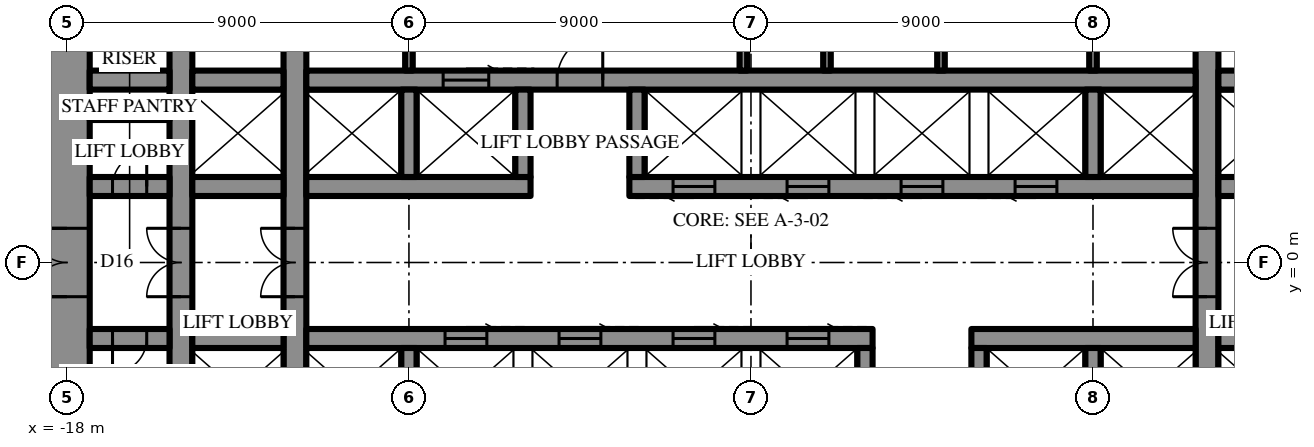
"""IFC4 building model, lengths in metres.
Left out: names, types, materials, properties, quantities, classifications, styles, units other than length and angle.
Written with IfcOpenShell. Run it as: python <this file> out.ifc"""

import sys

from ifc_helpers import new_model, si_unit, direction, frame, frame_2d, origin, place, context, subcontext, project, spatial, rectangle, extrude, element, fill, save


model = new_model("IFC4")
c1 = context("Model", 3, precision=1e-05, world=origin(), true_north=direction((0.0, 1.0)))
c2 = subcontext(c1, "Body", "Model", "MODEL_VIEW")
j1 = project(units=[si_unit("LENGTHUNIT", "METRE"), si_unit("PLANEANGLEUNIT", "RADIAN")], contexts=[c1])
p1 = place(None, origin())
s1 = spatial("IfcSite", under=j1, at=p1, CompositionType="ELEMENT")
p2 = place(p1, origin())
s2 = spatial("IfcBuilding", under=s1, at=p2, CompositionType="ELEMENT")
p3 = place(p2, frame((0.0, 0.0, 144.7)))
s3 = spatial("IfcBuildingStorey", under=s2, at=p3, CompositionType="ELEMENT", Elevation=144.7)
p4 = place(p3, frame((-18.0, 10.7, 0.0), z_axis=(0.0, 0.0, 1.0), x_axis=(0.0, -1.0, 0.0)))
e1 = element("IfcWall", 1, at=p4, inside=s3, PredefinedType="SHEAR", context=c2, shape_type="SweptSolid", body=[
    extrude(rectangle(XDim=21.4, YDim=1.2, at=frame_2d((10.7, 0.0))), origin(), (0.0, 0.0, 1.0), 4.2),
])
p5 = place(p4, frame((9.8, 0.0, 0.0)))
e2 = element("IfcOpeningElement", 2, at=p5, cuts=e1, PredefinedType="OPENING", context=c2, shape_type="SweptSolid", body=[
    extrude(rectangle(XDim=1.8, YDim=2.4, at=frame_2d((0.9, 1.2))), frame((0.0, 0.61, 0.0), z_axis=(0.0, -1.0, 0.0), x_axis=(1.0, 0.0, 0.0)), (0.0, 0.0, 1.0), 1.22),
])
p6 = place(p3, frame((12.0, -10.7, 0.0), z_axis=(0.0, 0.0, 1.0), x_axis=(0.0, 1.0, 0.0)))
e3 = element("IfcWall", 3, at=p6, inside=s3, PredefinedType="SHEAR", context=c2, shape_type="SweptSolid", body=[
    extrude(rectangle(XDim=21.4, YDim=0.6, at=frame_2d((10.7, 0.0))), origin(), (0.0, 0.0, 1.0), 4.2),
])
p7 = place(p6, frame((9.8, 0.0, 0.0)))
e4 = element("IfcOpeningElement", 4, at=p7, cuts=e3, PredefinedType="OPENING", context=c2, shape_type="SweptSolid", body=[
    extrude(rectangle(XDim=1.8, YDim=2.4, at=frame_2d((0.9, 1.2))), frame((0.0, 0.31, 0.0), z_axis=(0.0, -1.0, 0.0), x_axis=(1.0, 0.0, 0.0)), (0.0, 0.0, 1.0), 0.62),
])
p8 = place(p3, frame((-12.0, -10.7, 0.0), z_axis=(0.0, 0.0, 1.0), x_axis=(0.0, 1.0, 0.0)))
e5 = element("IfcWall", 5, at=p8, inside=s3, PredefinedType="SHEAR", context=c2, shape_type="SweptSolid", body=[
    extrude(rectangle(XDim=21.4, YDim=0.6, at=frame_2d((10.7, 0.0))), origin(), (0.0, 0.0, 1.0), 4.2),
])
p9 = place(p8, frame((9.8, 0.0, 0.0)))
e6 = element("IfcOpeningElement", 6, at=p9, cuts=e5, PredefinedType="OPENING", context=c2, shape_type="SweptSolid", body=[
    extrude(rectangle(XDim=1.8, YDim=2.4, at=frame_2d((0.9, 1.2))), frame((0.0, 0.31, 0.0), z_axis=(0.0, -1.0, 0.0), x_axis=(1.0, 0.0, 0.0)), (0.0, 0.0, 1.0), 0.62),
])
p10 = place(p3, frame((-15.0, -10.7, 0.0), z_axis=(0.0, 0.0, 1.0), x_axis=(0.0, 1.0, 0.0)))
e7 = element("IfcWall", 7, at=p10, inside=s3, PredefinedType="SHEAR", context=c2, shape_type="SweptSolid", body=[
    extrude(rectangle(XDim=21.4, YDim=0.6, at=frame_2d((10.7, 0.0))), origin(), (0.0, 0.0, 1.0), 4.2),
])
p11 = place(p10, frame((9.8, 0.0, 0.0)))
e8 = element("IfcOpeningElement", 8, at=p11, cuts=e7, PredefinedType="OPENING", context=c2, shape_type="SweptSolid", body=[
    extrude(rectangle(XDim=1.8, YDim=2.4, at=frame_2d((0.9, 1.2))), frame((0.0, 0.31, 0.0), z_axis=(0.0, -1.0, 0.0), x_axis=(1.0, 0.0, 0.0)), (0.0, 0.0, 1.0), 0.62),
])
p12 = place(p3, frame((-17.4, 2.0, 0.0), z_axis=(0.0, 0.0, 1.0), x_axis=(1.0, 0.0, 0.0)))
e9 = element("IfcWall", 9, at=p12, inside=s3, PredefinedType="SHEAR", context=c2, shape_type="SweptSolid", body=[
    extrude(rectangle(XDim=2.1, YDim=0.5, at=frame_2d((1.05, 0.0))), origin(), (0.0, 0.0, 1.0), 4.2),
])
p13 = place(p12, frame((0.6, 0.0, 0.0)))
e10 = element("IfcOpeningElement", 10, at=p13, cuts=e9, PredefinedType="OPENING", context=c2, shape_type="SweptSolid", body=[
    extrude(rectangle(XDim=0.9, YDim=2.2, at=frame_2d((0.45, 1.1))), frame((0.0, 0.26, 0.0), z_axis=(0.0, -1.0, 0.0), x_axis=(1.0, 0.0, 0.0)), (0.0, 0.0, 1.0), 0.52),
])
p14 = place(p3, frame((-14.7, 2.0, 0.0), z_axis=(0.0, 0.0, 1.0), x_axis=(1.0, 0.0, 0.0)))
e11 = element("IfcWall", 11, at=p14, inside=s3, PredefinedType="SHEAR", context=c2, shape_type="SweptSolid", body=[
    extrude(rectangle(XDim=2.4, YDim=0.5, at=frame_2d((1.2, 0.0))), origin(), (0.0, 0.0, 1.0), 4.2),
])
p15 = place(p3, frame((-11.7, 2.0, 0.0), z_axis=(0.0, 0.0, 1.0), x_axis=(1.0, 0.0, 0.0)))
e12 = element("IfcWall", 12, at=p15, inside=s3, PredefinedType="SHEAR", context=c2, shape_type="SweptSolid", body=[
    extrude(rectangle(XDim=5.9, YDim=0.5, at=frame_2d((2.95, 0.0))), origin(), (0.0, 0.0, 1.0), 4.2),
])
p16 = place(p3, frame((-3.2, 2.0, 0.0), z_axis=(0.0, 0.0, 1.0), x_axis=(1.0, 0.0, 0.0)))
e13 = element("IfcWall", 13, at=p16, inside=s3, PredefinedType="SHEAR", context=c2, shape_type="SweptSolid", body=[
    extrude(rectangle(XDim=14.9, YDim=0.5, at=frame_2d((7.45, 0.0))), origin(), (0.0, 0.0, 1.0), 4.2),
])
p17 = place(p16, frame((1.15, 0.0, 0.0)))
e14 = element("IfcOpeningElement", 14, at=p17, cuts=e13, PredefinedType="OPENING", context=c2, shape_type="SweptSolid", body=[
    extrude(rectangle(XDim=1.1, YDim=2.2, at=frame_2d((0.55, 1.1))), frame((0.0, 0.26, 0.0), z_axis=(0.0, -1.0, 0.0), x_axis=(1.0, 0.0, 0.0)), (0.0, 0.0, 1.0), 0.52),
])
p18 = place(p16, frame((4.15, 0.0, 0.0)))
e15 = element("IfcOpeningElement", 15, at=p18, cuts=e13, PredefinedType="OPENING", context=c2, shape_type="SweptSolid", body=[
    extrude(rectangle(XDim=1.1, YDim=2.2, at=frame_2d((0.55, 1.1))), frame((0.0, 0.26, 0.0), z_axis=(0.0, -1.0, 0.0), x_axis=(1.0, 0.0, 0.0)), (0.0, 0.0, 1.0), 0.52),
])
p19 = place(p16, frame((7.15, 0.0, 0.0)))
e16 = element("IfcOpeningElement", 16, at=p19, cuts=e13, PredefinedType="OPENING", context=c2, shape_type="SweptSolid", body=[
    extrude(rectangle(XDim=1.1, YDim=2.2, at=frame_2d((0.55, 1.1))), frame((0.0, 0.26, 0.0), z_axis=(0.0, -1.0, 0.0), x_axis=(1.0, 0.0, 0.0)), (0.0, 0.0, 1.0), 0.52),
])
p20 = place(p16, frame((10.15, 0.0, 0.0)))
e17 = element("IfcOpeningElement", 17, at=p20, cuts=e13, PredefinedType="OPENING", context=c2, shape_type="SweptSolid", body=[
    extrude(rectangle(XDim=1.1, YDim=2.2, at=frame_2d((0.55, 1.1))), frame((0.0, 0.26, 0.0), z_axis=(0.0, -1.0, 0.0), x_axis=(1.0, 0.0, 0.0)), (0.0, 0.0, 1.0), 0.52),
])
p21 = place(p3, frame((12.3, 2.0, 0.0), z_axis=(0.0, 0.0, 1.0), x_axis=(1.0, 0.0, 0.0)))
e18 = element("IfcWall", 18, at=p21, inside=s3, PredefinedType="SHEAR", context=c2, shape_type="SweptSolid", body=[
    extrude(rectangle(XDim=2.4, YDim=0.5, at=frame_2d((1.2, 0.0))), origin(), (0.0, 0.0, 1.0), 4.2),
])
p22 = place(p3, frame((-17.4, 4.8, 0.0), z_axis=(0.0, 0.0, 1.0), x_axis=(1.0, 0.0, 0.0)))
e19 = element("IfcWall", 19, at=p22, inside=s3, PredefinedType="SHEAR", context=c2, shape_type="SweptSolid", body=[
    extrude(rectangle(XDim=2.1, YDim=0.5, at=frame_2d((1.05, 0.0))), origin(), (0.0, 0.0, 1.0), 4.2),
])
p23 = place(p3, frame((-14.7, 4.8, 0.0), z_axis=(0.0, 0.0, 1.0), x_axis=(1.0, 0.0, 0.0)))
e20 = element("IfcWall", 20, at=p23, inside=s3, PredefinedType="SHEAR", context=c2, shape_type="SweptSolid", body=[
    extrude(rectangle(XDim=2.4, YDim=0.5, at=frame_2d((1.2, 0.0))), origin(), (0.0, 0.0, 1.0), 4.2),
])
p24 = place(p3, frame((-11.7, 4.8, 0.0), z_axis=(0.0, 0.0, 1.0), x_axis=(1.0, 0.0, 0.0)))
e21 = element("IfcWall", 21, at=p24, inside=s3, PredefinedType="SHEAR", context=c2, shape_type="SweptSolid", body=[
    extrude(rectangle(XDim=23.4, YDim=0.5, at=frame_2d((11.7, 0.0))), origin(), (0.0, 0.0, 1.0), 4.2),
])
p25 = place(p24, frame((6.6, 0.0, 0.0)))
e22 = element("IfcOpeningElement", 22, at=p25, cuts=e21, PredefinedType="OPENING", context=c2, shape_type="SweptSolid", body=[
    extrude(rectangle(XDim=1.2, YDim=2.2, at=frame_2d((0.6, 1.1))), frame((0.0, 0.26, 0.0), z_axis=(0.0, -1.0, 0.0), x_axis=(1.0, 0.0, 0.0)), (0.0, 0.0, 1.0), 0.52),
])
p26 = place(p24, frame((3.6, 0.0, 0.0)))
e23 = element("IfcOpeningElement", 23, at=p26, cuts=e21, PredefinedType="OPENING", context=c2, shape_type="SweptSolid", body=[
    extrude(rectangle(XDim=1.2, YDim=2.2, at=frame_2d((0.6, 1.1))), frame((0.0, 0.26, 0.0), z_axis=(0.0, -1.0, 0.0), x_axis=(1.0, 0.0, 0.0)), (0.0, 0.0, 1.0), 0.52),
])
p27 = place(p3, frame((12.3, 4.8, 0.0), z_axis=(0.0, 0.0, 1.0), x_axis=(1.0, 0.0, 0.0)))
e24 = element("IfcWall", 24, at=p27, inside=s3, PredefinedType="SHEAR", context=c2, shape_type="SweptSolid", body=[
    extrude(rectangle(XDim=2.4, YDim=0.5, at=frame_2d((1.2, 0.0))), origin(), (0.0, 0.0, 1.0), 4.2),
])
for number, where, z_axis, x_axis in (
    (25, (-9.0, 2.25, 0.0), (0.0, 0.0, 1.0), (0.0, 1.0, 0.0)),
    (26, (-6.0, 2.25, 0.0), (0.0, 0.0, 1.0), (0.0, 1.0, 0.0)),
    (27, (-3.0, 2.25, 0.0), (0.0, 0.0, 1.0), (0.0, 1.0, 0.0)),
    (28, (9.0, 2.25, 0.0), (0.0, 0.0, 1.0), (0.0, 1.0, 0.0)),
):
    element("IfcWall", number, at=place(p3, frame(where, z_axis=z_axis, x_axis=x_axis)), inside=s3, PredefinedType="SHEAR", context=c2, shape_type="SweptSolid", body=[
        extrude(rectangle(XDim=2.3, YDim=0.4, at=frame_2d((1.15, 0.0))), origin(), (0.0, 0.0, 1.0), 4.2),
    ])
p28 = place(p3, frame((-0.2, 5.05, 0.0), z_axis=(0.0, 0.0, 1.0), x_axis=(0.0, 1.0, 0.0)))
e29 = element("IfcWall", 29, at=p28, inside=s3, PredefinedType="SHEAR", context=c2, shape_type="SweptSolid", body=[
    extrude(rectangle(XDim=5.65, YDim=0.2, at=frame_2d((2.825, 0.0))), origin(), (0.0, 0.0, 1.0), 4.2),
])
p29 = place(p3, frame((14.7, -2.0, 0.0), z_axis=(0.0, 0.0, 1.0), x_axis=(-1.0, 0.0, 0.0)))
e30 = element("IfcWall", 30, at=p29, inside=s3, PredefinedType="SHEAR", context=c2, shape_type="SweptSolid", body=[
    extrude(rectangle(XDim=2.4, YDim=0.5, at=frame_2d((1.2, 0.0))), origin(), (0.0, 0.0, 1.0), 4.2),
])
p30 = place(p3, frame((11.7, -2.0, 0.0), z_axis=(0.0, 0.0, 1.0), x_axis=(-1.0, 0.0, 0.0)))
e31 = element("IfcWall", 31, at=p30, inside=s3, PredefinedType="SHEAR", context=c2, shape_type="SweptSolid", body=[
    extrude(rectangle(XDim=5.9, YDim=0.5, at=frame_2d((2.95, 0.0))), origin(), (0.0, 0.0, 1.0), 4.2),
])
p31 = place(p3, frame((3.2, -2.0, 0.0), z_axis=(0.0, 0.0, 1.0), x_axis=(-1.0, 0.0, 0.0)))
e32 = element("IfcWall", 32, at=p31, inside=s3, PredefinedType="SHEAR", context=c2, shape_type="SweptSolid", body=[
    extrude(rectangle(XDim=14.9, YDim=0.5, at=frame_2d((7.45, 0.0))), origin(), (0.0, 0.0, 1.0), 4.2),
])
p32 = place(p31, frame((1.15, 0.0, 0.0)))
e33 = element("IfcOpeningElement", 33, at=p32, cuts=e32, PredefinedType="OPENING", context=c2, shape_type="SweptSolid", body=[
    extrude(rectangle(XDim=1.1, YDim=2.2, at=frame_2d((0.55, 1.1))), frame((0.0, 0.26, 0.0), z_axis=(0.0, -1.0, 0.0), x_axis=(1.0, 0.0, 0.0)), (0.0, 0.0, 1.0), 0.52),
])
p33 = place(p31, frame((4.15, 0.0, 0.0)))
e34 = element("IfcOpeningElement", 34, at=p33, cuts=e32, PredefinedType="OPENING", context=c2, shape_type="SweptSolid", body=[
    extrude(rectangle(XDim=1.1, YDim=2.2, at=frame_2d((0.55, 1.1))), frame((0.0, 0.26, 0.0), z_axis=(0.0, -1.0, 0.0), x_axis=(1.0, 0.0, 0.0)), (0.0, 0.0, 1.0), 0.52),
])
p34 = place(p31, frame((7.15, 0.0, 0.0)))
e35 = element("IfcOpeningElement", 35, at=p34, cuts=e32, PredefinedType="OPENING", context=c2, shape_type="SweptSolid", body=[
    extrude(rectangle(XDim=1.1, YDim=2.2, at=frame_2d((0.55, 1.1))), frame((0.0, 0.26, 0.0), z_axis=(0.0, -1.0, 0.0), x_axis=(1.0, 0.0, 0.0)), (0.0, 0.0, 1.0), 0.52),
])
p35 = place(p31, frame((10.15, 0.0, 0.0)))
e36 = element("IfcOpeningElement", 36, at=p35, cuts=e32, PredefinedType="OPENING", context=c2, shape_type="SweptSolid", body=[
    extrude(rectangle(XDim=1.1, YDim=2.2, at=frame_2d((0.55, 1.1))), frame((0.0, 0.26, 0.0), z_axis=(0.0, -1.0, 0.0), x_axis=(1.0, 0.0, 0.0)), (0.0, 0.0, 1.0), 0.52),
])
p36 = place(p3, frame((-12.3, -2.0, 0.0), z_axis=(0.0, 0.0, 1.0), x_axis=(-1.0, 0.0, 0.0)))
e37 = element("IfcWall", 37, at=p36, inside=s3, PredefinedType="SHEAR", context=c2, shape_type="SweptSolid", body=[
    extrude(rectangle(XDim=2.4, YDim=0.5, at=frame_2d((1.2, 0.0))), origin(), (0.0, 0.0, 1.0), 4.2),
])
p37 = place(p3, frame((-15.3, -2.0, 0.0), z_axis=(0.0, 0.0, 1.0), x_axis=(-1.0, 0.0, 0.0)))
e38 = element("IfcWall", 38, at=p37, inside=s3, PredefinedType="SHEAR", context=c2, shape_type="SweptSolid", body=[
    extrude(rectangle(XDim=2.1, YDim=0.5, at=frame_2d((1.05, 0.0))), origin(), (0.0, 0.0, 1.0), 4.2),
])
p38 = place(p37, frame((0.6, 0.0, 0.0)))
e39 = element("IfcOpeningElement", 39, at=p38, cuts=e38, PredefinedType="OPENING", context=c2, shape_type="SweptSolid", body=[
    extrude(rectangle(XDim=0.9, YDim=2.2, at=frame_2d((0.45, 1.1))), frame((0.0, 0.26, 0.0), z_axis=(0.0, -1.0, 0.0), x_axis=(1.0, 0.0, 0.0)), (0.0, 0.0, 1.0), 0.52),
])
for number, where, z_axis, x_axis in (
    (40, (9.0, -2.25, 0.0), (0.0, 0.0, 1.0), (0.0, -1.0, 0.0)),
    (41, (6.0, -2.25, 0.0), (0.0, 0.0, 1.0), (0.0, -1.0, 0.0)),
    (42, (3.0, -2.25, 0.0), (0.0, 0.0, 1.0), (0.0, -1.0, 0.0)),
    (43, (-9.0, -2.25, 0.0), (0.0, 0.0, 1.0), (0.0, -1.0, 0.0)),
):
    element("IfcWall", number, at=place(p3, frame(where, z_axis=z_axis, x_axis=x_axis)), inside=s3, PredefinedType="SHEAR", context=c2, shape_type="SweptSolid", body=[
        extrude(rectangle(XDim=2.3, YDim=0.4, at=frame_2d((1.15, 0.0))), origin(), (0.0, 0.0, 1.0), 4.2),
    ])
for number, where, z_axis, x_axis in (
    (44, (-9.0, 5.05, 0.0), (0.0, 0.0, 1.0), (0.0, 1.0, 0.0)),
    (45, (9.0, 5.05, 0.0), (0.0, 0.0, 1.0), (0.0, 1.0, 0.0)),
    (46, (2.0, 5.05, 0.0), (0.0, 0.0, 1.0), (0.0, 1.0, 0.0)),
    (47, (5.0, 5.05, 0.0), (0.0, 0.0, 1.0), (0.0, 1.0, 0.0)),
):
    element("IfcWall", number, at=place(p3, frame(where, z_axis=z_axis, x_axis=x_axis)), inside=s3, PredefinedType="PARTITIONING", context=c2, shape_type="SweptSolid", body=[
        extrude(rectangle(XDim=5.65, YDim=0.2, at=frame_2d((2.825, 0.0))), origin(), (0.0, 0.0, 1.0), 4.0),
    ])
p39 = place(p3, frame((-17.4, 3.85, 0.0), z_axis=(0.0, 0.0, 1.0), x_axis=(1.0, 0.0, 0.0)))
e48 = element("IfcWall", 48, at=p39, inside=s3, PredefinedType="PARTITIONING", context=c2, shape_type="SweptSolid", body=[
    extrude(rectangle(XDim=2.1, YDim=0.2, at=frame_2d((1.05, 0.0))), origin(), (0.0, 0.0, 1.0), 4.0),
])
p40 = place(p5, frame((1.8, 0.0, 0.0), z_axis=(0.0, 0.0, 1.0), x_axis=(-1.0, 0.0, 0.0)))
e49 = element("IfcDoor", 49, at=p40, inside=s3, OperationType="DOUBLE_DOOR_SINGLE_SWING", PredefinedType="DOOR", context=c2, shape_type="SweptSolid", body=[
    extrude(rectangle(XDim=1.8, YDim=2.4, at=frame_2d((0.9, 1.2))), frame((0.0, 0.025, 0.0), z_axis=(0.0, -1.0, 0.0), x_axis=(1.0, 0.0, 0.0)), (0.0, 0.0, 1.0), 0.05),
])
fill(e2, e49)
p41 = place(p25, origin())
e50 = element("IfcDoor", 50, at=p41, inside=s3, OperationType="SINGLE_SWING_LEFT", PredefinedType="DOOR", context=c2, shape_type="SweptSolid", body=[
    extrude(rectangle(XDim=1.2, YDim=2.2, at=frame_2d((0.6, 1.1))), frame((0.0, 0.025, 0.0), z_axis=(0.0, -1.0, 0.0), x_axis=(1.0, 0.0, 0.0)), (0.0, 0.0, 1.0), 0.05),
])
fill(e22, e50)
p42 = place(p13, origin())
e51 = element("IfcDoor", 51, at=p42, inside=s3, OperationType="SINGLE_SWING_LEFT", PredefinedType="DOOR", context=c2, shape_type="SweptSolid", body=[
    extrude(rectangle(XDim=0.9, YDim=2.2, at=frame_2d((0.45, 1.1))), frame((0.0, 0.025, 0.0), z_axis=(0.0, -1.0, 0.0), x_axis=(1.0, 0.0, 0.0)), (0.0, 0.0, 1.0), 0.05),
])
fill(e10, e51)
p43 = place(p38, origin())
e52 = element("IfcDoor", 52, at=p43, inside=s3, OperationType="SINGLE_SWING_LEFT", PredefinedType="DOOR", context=c2, shape_type="SweptSolid", body=[
    extrude(rectangle(XDim=0.9, YDim=2.2, at=frame_2d((0.45, 1.1))), frame((0.0, 0.025, 0.0), z_axis=(0.0, -1.0, 0.0), x_axis=(1.0, 0.0, 0.0)), (0.0, 0.0, 1.0), 0.05),
])
fill(e39, e52)
p44 = place(p7, origin())
e53 = element("IfcDoor", 53, at=p44, inside=s3, OperationType="DOUBLE_DOOR_SINGLE_SWING", PredefinedType="DOOR", context=c2, shape_type="SweptSolid", body=[
    extrude(rectangle(XDim=1.8, YDim=2.4, at=frame_2d((0.9, 1.2))), frame((0.0, 0.025, 0.0), z_axis=(0.0, -1.0, 0.0), x_axis=(1.0, 0.0, 0.0)), (0.0, 0.0, 1.0), 0.05),
])
fill(e4, e53)
p45 = place(p9, origin())
e54 = element("IfcDoor", 54, at=p45, inside=s3, OperationType="DOUBLE_DOOR_SINGLE_SWING", PredefinedType="DOOR", context=c2, shape_type="SweptSolid", body=[
    extrude(rectangle(XDim=1.8, YDim=2.4, at=frame_2d((0.9, 1.2))), frame((0.0, 0.025, 0.0), z_axis=(0.0, -1.0, 0.0), x_axis=(1.0, 0.0, 0.0)), (0.0, 0.0, 1.0), 0.05),
])
fill(e6, e54)
p46 = place(p11, origin())
e55 = element("IfcDoor", 55, at=p46, inside=s3, OperationType="DOUBLE_DOOR_SINGLE_SWING", PredefinedType="DOOR", context=c2, shape_type="SweptSolid", body=[
    extrude(rectangle(XDim=1.8, YDim=2.4, at=frame_2d((0.9, 1.2))), frame((0.0, 0.025, 0.0), z_axis=(0.0, -1.0, 0.0), x_axis=(1.0, 0.0, 0.0)), (0.0, 0.0, 1.0), 0.05),
])
fill(e8, e55)
p47 = place(p26, origin())
e56 = element("IfcDoor", 56, at=p47, inside=s3, OperationType="SLIDING_TO_LEFT", PredefinedType="DOOR", context=c2, shape_type="SweptSolid", body=[
    extrude(rectangle(XDim=1.2, YDim=2.2, at=frame_2d((0.6, 1.1))), frame((0.0, 0.025, 0.0), z_axis=(0.0, -1.0, 0.0), x_axis=(1.0, 0.0, 0.0)), (0.0, 0.0, 1.0), 0.05),
])
fill(e23, e56)
p48 = place(p17, frame((1.1, 0.0, 0.0), z_axis=(0.0, 0.0, 1.0), x_axis=(-1.0, 0.0, 0.0)))
e57 = element("IfcDoor", 57, at=p48, inside=s3, OperationType="SLIDING_TO_LEFT", PredefinedType="DOOR", context=c2, shape_type="SweptSolid", body=[
    extrude(rectangle(XDim=1.1, YDim=2.2, at=frame_2d((0.55, 1.1))), frame((0.0, 0.025, 0.0), z_axis=(0.0, -1.0, 0.0), x_axis=(1.0, 0.0, 0.0)), (0.0, 0.0, 1.0), 0.05),
])
fill(e14, e57)
p49 = place(p18, frame((1.1, 0.0, 0.0), z_axis=(0.0, 0.0, 1.0), x_axis=(-1.0, 0.0, 0.0)))
e58 = element("IfcDoor", 58, at=p49, inside=s3, OperationType="SLIDING_TO_LEFT", PredefinedType="DOOR", context=c2, shape_type="SweptSolid", body=[
    extrude(rectangle(XDim=1.1, YDim=2.2, at=frame_2d((0.55, 1.1))), frame((0.0, 0.025, 0.0), z_axis=(0.0, -1.0, 0.0), x_axis=(1.0, 0.0, 0.0)), (0.0, 0.0, 1.0), 0.05),
])
fill(e15, e58)
p50 = place(p19, frame((1.1, 0.0, 0.0), z_axis=(0.0, 0.0, 1.0), x_axis=(-1.0, 0.0, 0.0)))
e59 = element("IfcDoor", 59, at=p50, inside=s3, OperationType="SLIDING_TO_LEFT", PredefinedType="DOOR", context=c2, shape_type="SweptSolid", body=[
    extrude(rectangle(XDim=1.1, YDim=2.2, at=frame_2d((0.55, 1.1))), frame((0.0, 0.025, 0.0), z_axis=(0.0, -1.0, 0.0), x_axis=(1.0, 0.0, 0.0)), (0.0, 0.0, 1.0), 0.05),
])
fill(e16, e59)
p51 = place(p20, frame((1.1, 0.0, 0.0), z_axis=(0.0, 0.0, 1.0), x_axis=(-1.0, 0.0, 0.0)))
e60 = element("IfcDoor", 60, at=p51, inside=s3, OperationType="SLIDING_TO_LEFT", PredefinedType="DOOR", context=c2, shape_type="SweptSolid", body=[
    extrude(rectangle(XDim=1.1, YDim=2.2, at=frame_2d((0.55, 1.1))), frame((0.0, 0.025, 0.0), z_axis=(0.0, -1.0, 0.0), x_axis=(1.0, 0.0, 0.0)), (0.0, 0.0, 1.0), 0.05),
])
fill(e17, e60)
p52 = place(p32, frame((1.1, 0.0, 0.0), z_axis=(0.0, 0.0, 1.0), x_axis=(-1.0, 0.0, 0.0)))
e61 = element("IfcDoor", 61, at=p52, inside=s3, OperationType="SLIDING_TO_LEFT", PredefinedType="DOOR", context=c2, shape_type="SweptSolid", body=[
    extrude(rectangle(XDim=1.1, YDim=2.2, at=frame_2d((0.55, 1.1))), frame((0.0, 0.025, 0.0), z_axis=(0.0, -1.0, 0.0), x_axis=(1.0, 0.0, 0.0)), (0.0, 0.0, 1.0), 0.05),
])
fill(e33, e61)
p53 = place(p33, frame((1.1, 0.0, 0.0), z_axis=(0.0, 0.0, 1.0), x_axis=(-1.0, 0.0, 0.0)))
e62 = element("IfcDoor", 62, at=p53, inside=s3, OperationType="SLIDING_TO_LEFT", PredefinedType="DOOR", context=c2, shape_type="SweptSolid", body=[
    extrude(rectangle(XDim=1.1, YDim=2.2, at=frame_2d((0.55, 1.1))), frame((0.0, 0.025, 0.0), z_axis=(0.0, -1.0, 0.0), x_axis=(1.0, 0.0, 0.0)), (0.0, 0.0, 1.0), 0.05),
])
fill(e34, e62)
p54 = place(p34, frame((1.1, 0.0, 0.0), z_axis=(0.0, 0.0, 1.0), x_axis=(-1.0, 0.0, 0.0)))
e63 = element("IfcDoor", 63, at=p54, inside=s3, OperationType="SLIDING_TO_LEFT", PredefinedType="DOOR", context=c2, shape_type="SweptSolid", body=[
    extrude(rectangle(XDim=1.1, YDim=2.2, at=frame_2d((0.55, 1.1))), frame((0.0, 0.025, 0.0), z_axis=(0.0, -1.0, 0.0), x_axis=(1.0, 0.0, 0.0)), (0.0, 0.0, 1.0), 0.05),
])
fill(e35, e63)
p55 = place(p35, frame((1.1, 0.0, 0.0), z_axis=(0.0, 0.0, 1.0), x_axis=(-1.0, 0.0, 0.0)))
e64 = element("IfcDoor", 64, at=p55, inside=s3, OperationType="SLIDING_TO_LEFT", PredefinedType="DOOR", context=c2, shape_type="SweptSolid", body=[
    extrude(rectangle(XDim=1.1, YDim=2.2, at=frame_2d((0.55, 1.1))), frame((0.0, 0.025, 0.0), z_axis=(0.0, -1.0, 0.0), x_axis=(1.0, 0.0, 0.0)), (0.0, 0.0, 1.0), 0.05),
])
fill(e36, e64)
save(model, sys.argv[1])
